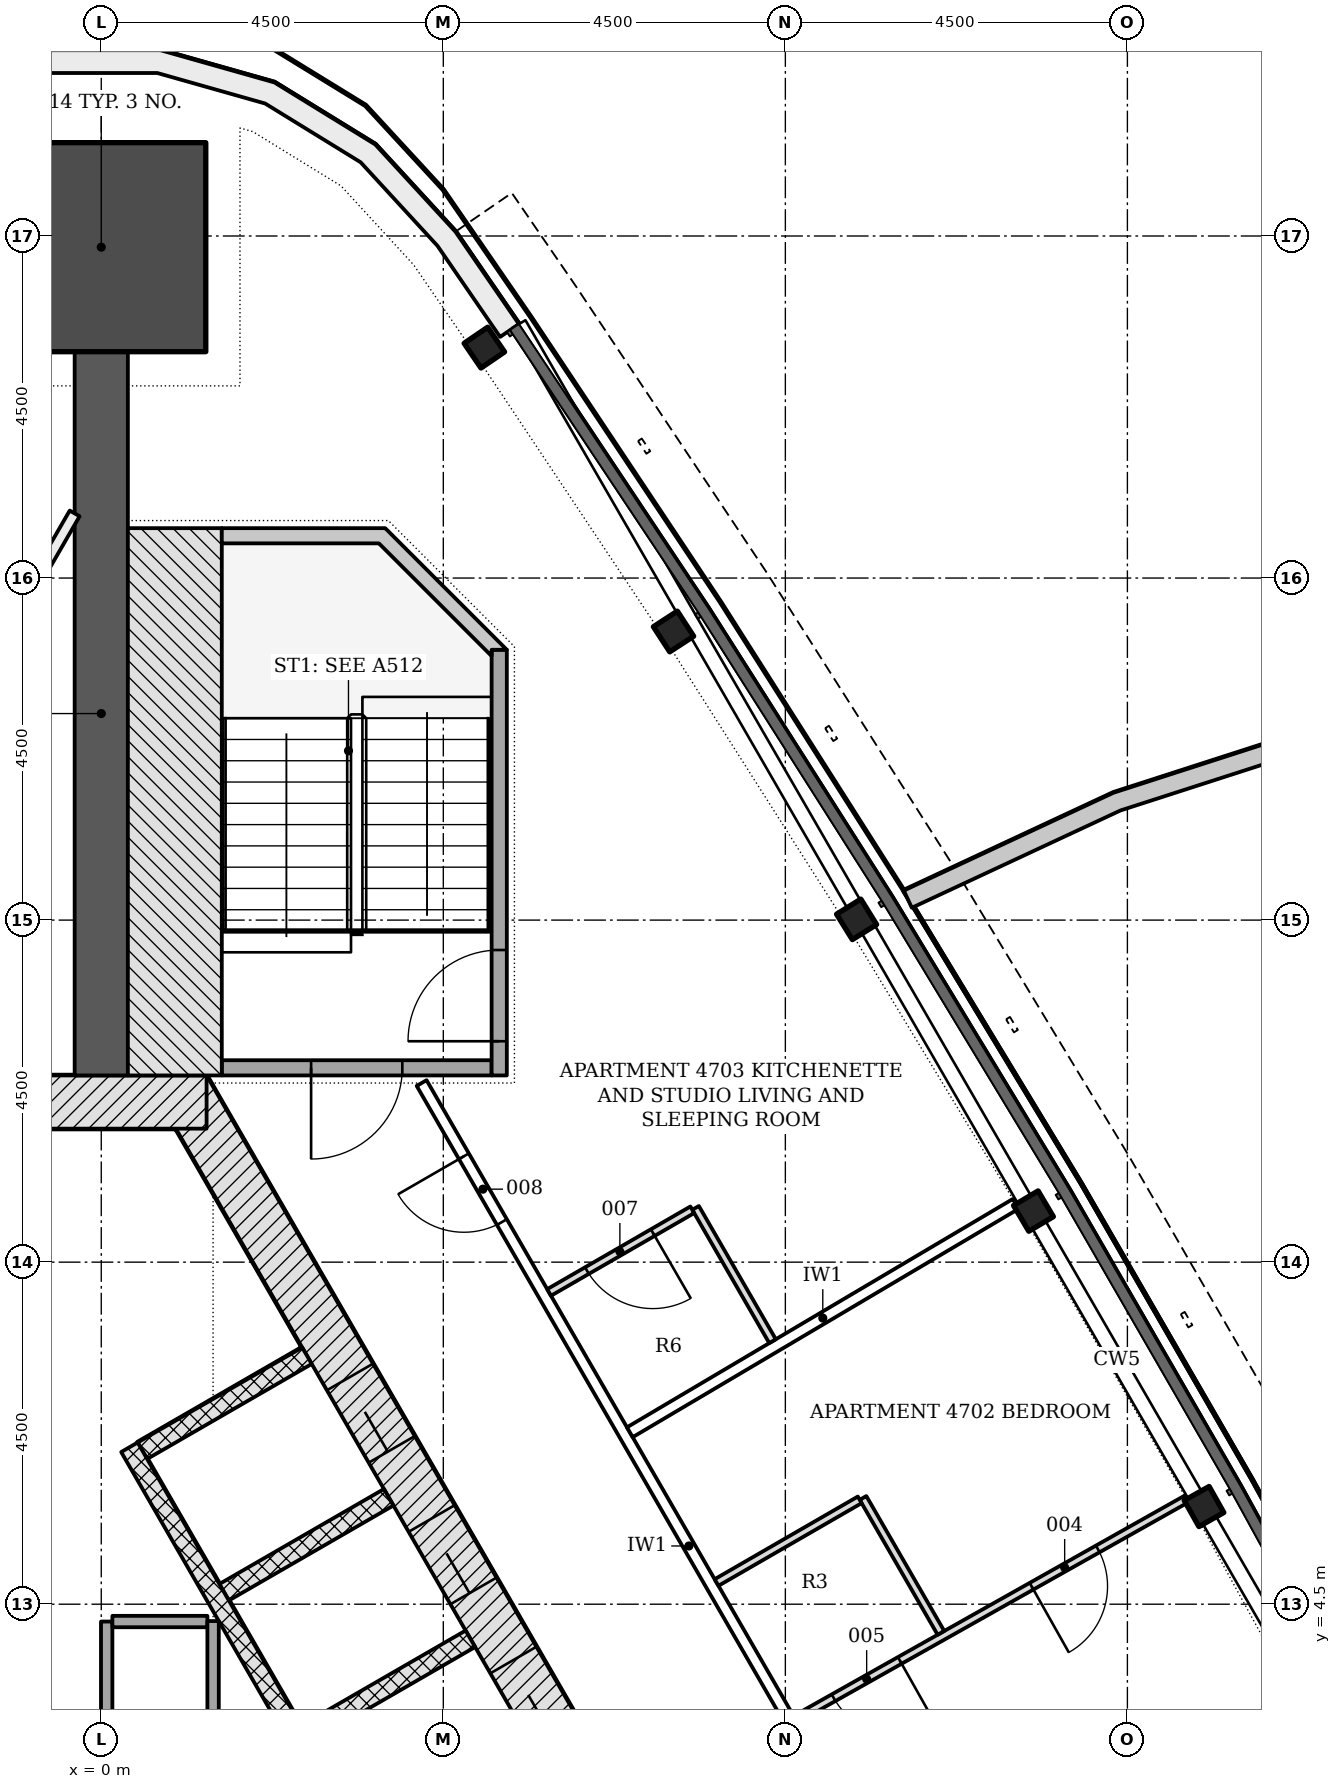
"""IFC4 building model, lengths in metres.
Left out: names, types, materials, properties, quantities, classifications, styles, units other than length and angle.
Written with IfcOpenShell. Run it as: python <this file> out.ifc"""

import sys

from ifc_helpers import new_model, si_unit, direction, frame, frame_2d, origin, origin_2d, place, context, subcontext, project, spatial, polyline, rectangle, i_section, outline, extrude, element, fill, save


model = new_model("IFC4")
c1 = context("Model", 3, precision=1e-05, world=origin(), true_north=direction((0.0, 1.0)))
c2 = subcontext(c1, "Body", "Model", "MODEL_VIEW")
j1 = project(units=[si_unit("LENGTHUNIT", "METRE"), si_unit("PLANEANGLEUNIT", "RADIAN")], contexts=[c1])
p1 = place(None, origin())
s1 = spatial("IfcSite", under=j1, at=p1, CompositionType="ELEMENT")
p2 = place(p1, origin())
s2 = spatial("IfcBuilding", under=s1, at=p2, CompositionType="ELEMENT")
p3 = place(p2, frame((0.0, 0.0, 185.1)))
s3 = spatial("IfcBuildingStorey", under=s2, at=p3, CompositionType="ELEMENT", Elevation=185.1)
p4 = place(p3, frame((10.311, -4.703, -0.2), z_axis=(0.0, 0.0, 1.0), x_axis=(-0.500001446645, 0.866024568562, 0.0)))
e1 = element("IfcWall", 1, at=p4, inside=s3, PredefinedType="SHEAR", context=c2, shape_type="SweptSolid", body=[
    extrude(rectangle(XDim=18.458, YDim=0.7, at=frame_2d((9.229, 0.0))), origin(), (0.0, 0.0, 1.0), 3.6),
])
p5 = place(p4, frame((4.379, 0.0, 0.2)))
e2 = element("IfcOpeningElement", 2, at=p5, cuts=e1, PredefinedType="OPENING", context=c2, shape_type="SweptSolid", body=[
    extrude(rectangle(XDim=1.1, YDim=2.1, at=frame_2d((0.55, 1.05))), frame((0.0, 0.36, 0.0), z_axis=(0.0, -1.0, 0.0), x_axis=(1.0, 0.0, 0.0)), (0.0, 0.0, 1.0), 0.72),
])
p6 = place(p4, frame((6.529, 0.0, 0.2)))
e3 = element("IfcOpeningElement", 3, at=p6, cuts=e1, PredefinedType="OPENING", context=c2, shape_type="SweptSolid", body=[
    extrude(rectangle(XDim=1.1, YDim=2.1, at=frame_2d((0.55, 1.05))), frame((0.0, 0.36, 0.0), z_axis=(0.0, -1.0, 0.0), x_axis=(1.0, 0.0, 0.0)), (0.0, 0.0, 1.0), 0.72),
])
p7 = place(p4, frame((8.679, 0.0, 0.2)))
e4 = element("IfcOpeningElement", 4, at=p7, cuts=e1, PredefinedType="OPENING", context=c2, shape_type="SweptSolid", body=[
    extrude(rectangle(XDim=1.1, YDim=2.1, at=frame_2d((0.55, 1.05))), frame((0.0, 0.36, 0.0), z_axis=(0.0, -1.0, 0.0), x_axis=(1.0, 0.0, 0.0)), (0.0, 0.0, 1.0), 0.72),
])
p8 = place(p4, frame((10.829, 0.0, 0.2)))
e5 = element("IfcOpeningElement", 5, at=p8, cuts=e1, PredefinedType="OPENING", context=c2, shape_type="SweptSolid", body=[
    extrude(rectangle(XDim=1.1, YDim=2.1, at=frame_2d((0.55, 1.05))), frame((0.0, 0.36, 0.0), z_axis=(0.0, -1.0, 0.0), x_axis=(1.0, 0.0, 0.0)), (0.0, 0.0, 1.0), 0.72),
])
p9 = place(p4, frame((12.979, 0.0, 0.2)))
e6 = element("IfcOpeningElement", 6, at=p9, cuts=e1, PredefinedType="OPENING", context=c2, shape_type="SweptSolid", body=[
    extrude(rectangle(XDim=1.1, YDim=2.1, at=frame_2d((0.55, 1.05))), frame((0.0, 0.36, 0.0), z_axis=(0.0, -1.0, 0.0), x_axis=(1.0, 0.0, 0.0)), (0.0, 0.0, 1.0), 0.72),
])
p10 = place(p3, frame((1.386, 11.106, -0.2), z_axis=(0.0, 0.0, 1.0), x_axis=(-1.0, 0.0, 0.0)))
e7 = element("IfcWall", 7, at=p10, inside=s3, PredefinedType="SHEAR", context=c2, shape_type="SweptSolid", body=[
    extrude(rectangle(XDim=2.771, YDim=0.7, at=frame_2d((1.386, 0.0))), origin(), (0.0, 0.0, 1.0), 3.6),
])
p11 = place(p3, frame((0.0, 11.456, -0.2), z_axis=(0.0, 0.0, 1.0), x_axis=(0.0, 1.0, 0.0)))
e8 = element("IfcWall", 8, at=p11, inside=s3, PredefinedType="SHEAR", context=c2, shape_type="SweptSolid", body=[
    extrude(rectangle(XDim=9.522, YDim=0.7, at=frame_2d((4.761, 0.0))), origin(), (0.0, 0.0, 1.0), 3.6),
])
p12 = place(p3, frame((0.0, 22.353, -0.2), z_axis=(0.0, 0.0, 1.0), x_axis=(0.0, 1.0, 0.0)))
e9 = element("IfcColumn", 9, at=p12, inside=s3, PredefinedType="COLUMN", context=c2, shape_type="SweptSolid", body=[
    extrude(rectangle(XDim=2.75, YDim=2.75, at=origin_2d()), origin(), (0.0, 0.0, 1.0), 3.6),
])
for number, where, z_axis, x_axis in (
    (10, (14.508, 5.785, -0.2), (0.0, 0.0, 1.0), (-0.491, 0.871, 0.0)),
    (11, (12.264, 9.672, -0.2), (0.0, 0.0, 1.0), (-0.509, 0.861, 0.0)),
    (12, (9.937, 13.51, -0.2), (0.0, 0.0, 1.0), (-0.528, 0.85, 0.0)),
    (13, (7.529, 17.297, -0.2), (0.0, 0.0, 1.0), (-0.546, 0.838, 0.0)),
    (14, (5.04, 21.032, -0.2), (0.0, 0.0, 1.0), (-0.563, 0.826, 0.0)),
):
    element("IfcColumn", number, at=place(p3, frame(where, z_axis=z_axis, x_axis=x_axis)), inside=s3, PredefinedType="COLUMN", context=c2, shape_type="SweptSolid", body=[
        extrude(i_section(OverallWidth=0.394, OverallDepth=0.376, WebThickness=0.017, FlangeThickness=0.028, FilletRadius=0.015, at=origin_2d()), origin(), (0.0, 0.0, 1.0), 3.6),
    ])
p13 = place(p3, origin())
e15 = element("IfcWall", 15, at=p13, inside=s3, PredefinedType="NOTDEFINED", context=c2, shape_type="SweptSolid", body=[
    extrude(outline(polyline([(5.494, 21.342), (4.659, 22.557), (3.605, 23.704), (2.278, 24.52), (0.779, 24.944), (-0.779, 24.944), (-2.278, 24.52), (-3.605, 23.704), (-4.659, 22.557), (-5.494, 21.342), (-5.247, 21.172), (-4.424, 22.369), (-3.412, 23.47), (-2.156, 24.243), (-0.737, 24.644), (0.737, 24.644), (2.156, 24.243), (3.412, 23.47), (4.424, 22.369), (5.247, 21.172), (5.494, 21.342)])), origin(), (0.0, 0.0, 1.0), 3.3),
])
p14 = place(p3, origin())
e16 = element("IfcWall", 16, at=p14, inside=s3, PredefinedType="PARAPET", context=c2, shape_type="SweptSolid", body=[
    extrude(outline(polyline([(22.265, -7.662), (24.846, -6.048), (27.171, -4.156), (29.169, -2.042), (30.78, 0.228), (31.954, 2.586), (32.656, 4.96), (32.864, 7.277), (32.572, 9.469), (31.789, 11.467), (30.539, 13.211), (28.86, 14.648), (26.802, 15.735), (24.429, 16.438), (21.812, 16.737), (19.031, 16.622), (16.171, 16.096), (13.317, 15.176), (10.558, 13.889), (10.664, 13.662), (13.409, 14.942), (16.232, 15.853), (19.059, 16.373), (21.803, 16.487), (24.379, 16.193), (26.708, 15.502), (28.719, 14.44), (30.354, 13.041), (31.568, 11.346), (32.328, 9.406), (32.612, 7.272), (32.409, 5.007), (31.72, 2.678), (30.565, 0.357), (28.976, -1.883), (27.001, -3.972), (24.7, -5.844), (22.132, -7.45), (22.265, -7.662)])), origin(), (0.0, 0.0, 1.0), 1.1),
])
for number, where, z_axis, x_axis in (
    (17, (4.856, 4.045, -0.2), (0.0, 0.0, 1.0), (-0.866, -0.5, 0.0)),
    (18, (3.781, 5.907, -0.2), (0.0, 0.0, 1.0), (-0.866, -0.5, 0.0)),
    (19, (2.706, 7.769, -0.2), (0.0, 0.0, 1.0), (-0.866, -0.5, 0.0)),
):
    element("IfcWall", number, at=place(p3, frame(where, z_axis=z_axis, x_axis=x_axis)), inside=s3, PredefinedType="PARTITIONING", context=c2, shape_type="SweptSolid", body=[
        extrude(rectangle(XDim=2.5, YDim=0.25, at=frame_2d((1.25, 0.0))), origin(), (0.0, 0.0, 1.0), 3.6),
    ])
p15 = place(p3, frame((5.87, -2.961, 0.0), z_axis=(0.0, 0.0, 1.0), x_axis=(-0.50000615651, 0.866021849293, 0.0)))
e20 = element("IfcWall", 20, at=p15, inside=s3, PredefinedType="PARTITIONING", context=c2, shape_type="SweptSolid", body=[
    extrude(rectangle(XDim=11.0, YDim=0.25, at=frame_2d((5.5, 0.0))), origin(), (0.0, 0.0, 1.0), 3.4),
])
p16 = place(p3, frame((0.071, 4.272, 0.0), z_axis=(0.0, 0.0, 1.0), x_axis=(0.0, -1.0, 0.0)))
e21 = element("IfcWall", 21, at=p16, inside=s3, PredefinedType="PARTITIONING", context=c2, shape_type="SweptSolid", body=[
    extrude(rectangle(XDim=10.5, YDim=0.15, at=frame_2d((5.25, 0.0))), origin(), (0.0, 0.0, 1.0), 3.4),
])
p17 = place(p16, frame((3.101, 0.0, 0.0)))
e22 = element("IfcOpeningElement", 22, at=p17, cuts=e21, PredefinedType="OPENING", context=c2, shape_type="SweptSolid", body=[
    extrude(rectangle(XDim=0.9, YDim=2.1, at=frame_2d((0.45, 1.05))), frame((0.0, 0.085, 0.0), z_axis=(0.0, -1.0, 0.0), x_axis=(1.0, 0.0, 0.0)), (0.0, 0.0, 1.0), 0.17),
])
p18 = place(p3, frame((0.146, 4.272, 0.0), z_axis=(0.0, 0.0, 1.0), x_axis=(1.0, 0.0, 0.0)))
e23 = element("IfcWall", 23, at=p18, inside=s3, PredefinedType="PARTITIONING", context=c2, shape_type="SweptSolid", body=[
    extrude(rectangle(XDim=1.25, YDim=0.15, at=frame_2d((0.625, 0.0))), origin(), (0.0, 0.0, 1.0), 3.4),
])
p19 = place(p3, frame((1.471, -5.928, 0.0), z_axis=(0.0, 0.0, 1.0), x_axis=(0.0, 1.0, 0.0)))
e24 = element("IfcWall", 24, at=p19, inside=s3, PredefinedType="PARTITIONING", context=c2, shape_type="SweptSolid", body=[
    extrude(rectangle(XDim=10.206, YDim=0.15, at=frame_2d((5.103, 0.0))), origin(), (0.0, 0.0, 1.0), 3.4),
])
p20 = place(p19, frame((6.15, 0.0, 0.0)))
e25 = element("IfcOpeningElement", 25, at=p20, cuts=e24, PredefinedType="OPENING", context=c2, shape_type="SweptSolid", body=[
    extrude(rectangle(XDim=1.0, YDim=2.1, at=frame_2d((0.5, 1.05))), frame((0.0, 0.085, 0.0), z_axis=(0.0, -1.0, 0.0), x_axis=(1.0, 0.0, 0.0)), (0.0, 0.0, 1.0), 0.17),
])
p21 = place(p3, frame((5.135, 11.556, -0.2), z_axis=(0.0, 0.0, 1.0), x_axis=(-1.0, 0.0, 0.0)))
e26 = element("IfcWall", 26, at=p21, inside=s3, PredefinedType="SHEAR", context=c2, shape_type="SweptSolid", body=[
    extrude(rectangle(XDim=3.55, YDim=0.2, at=frame_2d((1.775, 0.0))), origin(), (0.0, 0.0, 1.0), 3.6),
])
p22 = place(p21, frame((1.175, 0.0, 0.2)))
e27 = element("IfcOpeningElement", 27, at=p22, cuts=e26, PredefinedType="OPENING", context=c2, shape_type="SweptSolid", body=[
    extrude(rectangle(XDim=1.2, YDim=2.1, at=frame_2d((0.6, 1.05))), frame((0.0, 0.11, 0.0), z_axis=(0.0, -1.0, 0.0), x_axis=(1.0, 0.0, 0.0)), (0.0, 0.0, 1.0), 0.22),
])
p23 = place(p3, frame((5.236, 11.456, -0.2), z_axis=(0.0, 0.0, 1.0), x_axis=(0.0, 1.0, 0.0)))
e28 = element("IfcWall", 28, at=p23, inside=s3, PredefinedType="SHEAR", context=c2, shape_type="SweptSolid", body=[
    extrude(rectangle(XDim=5.6, YDim=0.2, at=frame_2d((2.8, 0.0))), origin(), (0.0, 0.0, 1.0), 3.6),
])
p24 = place(p23, frame((0.45, 0.0, 0.2)))
e29 = element("IfcOpeningElement", 29, at=p24, cuts=e28, PredefinedType="OPENING", context=c2, shape_type="SweptSolid", body=[
    extrude(rectangle(XDim=1.2, YDim=2.1, at=frame_2d((0.6, 1.05))), frame((0.0, 0.11, 0.0), z_axis=(0.0, -1.0, 0.0), x_axis=(1.0, 0.0, 0.0)), (0.0, 0.0, 1.0), 0.22),
])
p25 = place(p3, frame((0.968, 11.456, -0.2), z_axis=(0.0, 0.0, 1.0), x_axis=(0.0, 1.0, 0.0)))
e30 = element("IfcWall", 30, at=p25, inside=s3, PredefinedType="SHEAR", context=c2, shape_type="SweptSolid", body=[
    extrude(rectangle(XDim=7.2, YDim=1.236, at=frame_2d((3.6, 0.0))), origin(), (0.0, 0.0, 1.0), 3.6),
])
p26 = place(p3, frame((0.0, 0.0, -0.2)))
e31 = element("IfcWall", 31, at=p26, inside=s3, PredefinedType="SHEAR", context=c2, shape_type="SweptSolid", body=[
    extrude(outline(polyline([(5.336, 17.056), (3.736, 18.656), (1.586, 18.656), (1.586, 18.456), (3.653, 18.456), (5.135, 16.974), (5.135, 17.056), (5.135, 17.056), (5.135, 17.056), (5.135, 17.056), (5.135, 17.056), (5.135, 17.056), (5.135, 17.056), (5.135, 17.056), (5.135, 17.056), (5.135, 17.056), (5.135, 17.056), (5.135, 17.056), (5.135, 17.056), (5.135, 17.056), (5.135, 17.056), (5.135, 17.056), (5.135, 17.056), (5.336, 17.056)])), origin(), (0.0, 0.0, 1.0), 3.6),
])
p27 = place(p3, frame((11.247, -0.824, 0.0), z_axis=(0.0, 0.0, 1.0), x_axis=(-0.499997921847, 0.866026603603, 0.0)))
e32 = element("IfcWall", 32, at=p27, inside=s3, PredefinedType="PARTITIONING", context=c2, shape_type="SweptSolid", body=[
    extrude(rectangle(XDim=14.065, YDim=0.15, at=frame_2d((7.032, 0.0))), origin(), (0.0, 0.0, 1.0), 2.847),
])
p28 = place(p27, frame((11.953, 0.0, 0.0)))
e33 = element("IfcOpeningElement", 33, at=p28, cuts=e32, PredefinedType="OPENING", context=c2, shape_type="SweptSolid", body=[
    extrude(rectangle(XDim=1.0, YDim=2.1, at=frame_2d((0.5, 1.05))), frame((0.0, 0.085, 0.0), z_axis=(0.0, -1.0, 0.0), x_axis=(1.0, 0.0, 0.0)), (0.0, 0.0, 1.0), 0.17),
])
p29 = place(p3, frame((14.277, 5.885, 0.0), z_axis=(0.0, 0.0, 1.0), x_axis=(-0.871335785584, -0.490687220907, 0.0)))
e34 = element("IfcWall", 34, at=p29, inside=s3, PredefinedType="PARTITIONING", context=c2, shape_type="SweptSolid", body=[
    extrude(rectangle(XDim=5.904, YDim=0.1, at=frame_2d((2.952, 0.0))), origin(), (0.0, 0.0, 1.0), 3.4),
])
p30 = place(p29, frame((1.339, 0.0, 0.0)))
e35 = element("IfcOpeningElement", 35, at=p30, cuts=e34, PredefinedType="OPENING", context=c2, shape_type="SweptSolid", body=[
    extrude(rectangle(XDim=1.0, YDim=2.1, at=frame_2d((0.5, 1.05))), frame((0.0, 0.06, 0.0), z_axis=(0.0, -1.0, 0.0), x_axis=(1.0, 0.0, 0.0)), (0.0, 0.0, 1.0), 0.12),
])
p31 = place(p29, frame((4.329, 0.0, 0.0)))
e36 = element("IfcOpeningElement", 36, at=p31, cuts=e34, PredefinedType="OPENING", context=c2, shape_type="SweptSolid", body=[
    extrude(rectangle(XDim=1.0, YDim=2.1, at=frame_2d((0.5, 1.05))), frame((0.0, 0.06, 0.0), z_axis=(0.0, -1.0, 0.0), x_axis=(1.0, 0.0, 0.0)), (0.0, 0.0, 1.0), 0.12),
])
p32 = place(p3, frame((11.047, 4.123, 0.0), z_axis=(0.0, 0.0, 1.0), x_axis=(-0.500007699544, 0.866020958405, 0.0)))
e37 = element("IfcWall", 37, at=p32, inside=s3, PredefinedType="PARTITIONING", context=c2, shape_type="SweptSolid", body=[
    extrude(rectangle(XDim=2.05, YDim=0.1, at=frame_2d((1.025, 0.0))), origin(), (0.0, 0.0, 1.0), 3.4),
])
p33 = place(p3, frame((9.979, 5.873, 0.0), z_axis=(0.0, 0.0, 1.0), x_axis=(-0.866037911478, -0.499978335414, 0.0)))
e38 = element("IfcWall", 38, at=p33, inside=s3, PredefinedType="PARTITIONING", context=c2, shape_type="SweptSolid", body=[
    extrude(rectangle(XDim=2.175, YDim=0.1, at=frame_2d((1.087, 0.0))), origin(), (0.0, 0.0, 1.0), 3.4),
])
p34 = place(p3, frame((12.031, 9.766, 0.0), z_axis=(0.0, 0.0, 1.0), x_axis=(-0.860638865546, -0.509215811922, 0.0)))
e39 = element("IfcWall", 39, at=p34, inside=s3, PredefinedType="PARTITIONING", context=c2, shape_type="SweptSolid", body=[
    extrude(rectangle(XDim=5.9, YDim=0.15, at=frame_2d((2.95, 0.0))), origin(), (0.0, 0.0, 1.0), 3.4),
])
p35 = place(p3, frame((8.831, 7.96, 0.0), z_axis=(0.0, 0.0, 1.0), x_axis=(-0.499990325971, 0.866030989016, 0.0)))
e40 = element("IfcWall", 40, at=p35, inside=s3, PredefinedType="PARTITIONING", context=c2, shape_type="SweptSolid", body=[
    extrude(rectangle(XDim=2.025, YDim=0.1, at=frame_2d((1.012, 0.0))), origin(), (0.0, 0.0, 1.0), 3.4),
])
p36 = place(p3, frame((7.775, 9.689, 0.0), z_axis=(0.0, 0.0, 1.0), x_axis=(-0.865989304205, -0.500062521093, 0.0)))
e41 = element("IfcWall", 41, at=p36, inside=s3, PredefinedType="PARTITIONING", context=c2, shape_type="SweptSolid", body=[
    extrude(rectangle(XDim=2.175, YDim=0.1, at=frame_2d((1.087, 0.0))), origin(), (0.0, 0.0, 1.0), 3.4),
])
p37 = place(p36, frame((0.6, 0.0, 0.0)))
e42 = element("IfcOpeningElement", 42, at=p37, cuts=e41, PredefinedType="OPENING", context=c2, shape_type="SweptSolid", body=[
    extrude(rectangle(XDim=1.0, YDim=2.1, at=frame_2d((0.5, 1.05))), frame((0.0, 0.06, 0.0), z_axis=(0.0, -1.0, 0.0), x_axis=(1.0, 0.0, 0.0)), (0.0, 0.0, 1.0), 0.12),
])
p38 = place(p3, frame((-0.35, 18.85, 0.0), z_axis=(0.0, 0.0, 1.0), x_axis=(-0.500005388685, -0.866022292603, 0.0)))
e43 = element("IfcWall", 43, at=p38, inside=s3, PredefinedType="PARTITIONING", context=c2, shape_type="SweptSolid", body=[
    extrude(rectangle(XDim=14.167, YDim=0.15, at=frame_2d((7.083, 0.0))), origin(), (0.0, 0.0, 1.0), 2.847),
])
p39 = place(p7, origin())
e44 = element("IfcDoor", 44, at=p39, inside=s3, OperationType="DOUBLE_DOOR_SLIDING", PredefinedType="DOOR", context=c2, shape_type="SweptSolid", body=[
    extrude(rectangle(XDim=1.1, YDim=2.1, at=frame_2d((0.55, 1.05))), frame((0.0, 0.025, 0.0), z_axis=(0.0, -1.0, 0.0), x_axis=(1.0, 0.0, 0.0)), (0.0, 0.0, 1.0), 0.05),
])
fill(e4, e44)
p40 = place(p8, origin())
e45 = element("IfcDoor", 45, at=p40, inside=s3, OperationType="DOUBLE_DOOR_SLIDING", PredefinedType="DOOR", context=c2, shape_type="SweptSolid", body=[
    extrude(rectangle(XDim=1.1, YDim=2.1, at=frame_2d((0.55, 1.05))), frame((0.0, 0.025, 0.0), z_axis=(0.0, -1.0, 0.0), x_axis=(1.0, 0.0, 0.0)), (0.0, 0.0, 1.0), 0.05),
])
fill(e5, e45)
p41 = place(p9, origin())
e46 = element("IfcDoor", 46, at=p41, inside=s3, OperationType="DOUBLE_DOOR_SLIDING", PredefinedType="DOOR", context=c2, shape_type="SweptSolid", body=[
    extrude(rectangle(XDim=1.1, YDim=2.1, at=frame_2d((0.55, 1.05))), frame((0.0, 0.025, 0.0), z_axis=(0.0, -1.0, 0.0), x_axis=(1.0, 0.0, 0.0)), (0.0, 0.0, 1.0), 0.05),
])
fill(e6, e46)
p42 = place(p22, origin())
e47 = element("IfcDoor", 47, at=p42, inside=s3, OperationType="SINGLE_SWING_RIGHT", PredefinedType="DOOR", context=c2, shape_type="SweptSolid", body=[
    extrude(rectangle(XDim=1.2, YDim=2.1, at=frame_2d((0.6, 1.05))), frame((0.0, 0.025, 0.0), z_axis=(0.0, -1.0, 0.0), x_axis=(1.0, 0.0, 0.0)), (0.0, 0.0, 1.0), 0.05),
])
fill(e27, e47)
p43 = place(p24, origin())
e48 = element("IfcDoor", 48, at=p43, inside=s3, OperationType="SINGLE_SWING_LEFT", PredefinedType="DOOR", context=c2, shape_type="SweptSolid", body=[
    extrude(rectangle(XDim=1.2, YDim=2.1, at=frame_2d((0.6, 1.05))), frame((0.0, 0.025, 0.0), z_axis=(0.0, -1.0, 0.0), x_axis=(1.0, 0.0, 0.0)), (0.0, 0.0, 1.0), 0.05),
])
fill(e29, e48)
p44 = place(p30, origin())
e49 = element("IfcDoor", 49, at=p44, inside=s3, OperationType="SINGLE_SWING_RIGHT", PredefinedType="DOOR", context=c2, shape_type="SweptSolid", body=[
    extrude(rectangle(XDim=1.0, YDim=2.1, at=frame_2d((0.5, 1.05))), frame((0.0, 0.025, 0.0), z_axis=(0.0, -1.0, 0.0), x_axis=(1.0, 0.0, 0.0)), (0.0, 0.0, 1.0), 0.05),
])
fill(e35, e49)
p45 = place(p31, origin())
e50 = element("IfcDoor", 50, at=p45, inside=s3, OperationType="SINGLE_SWING_LEFT", PredefinedType="DOOR", context=c2, shape_type="SweptSolid", body=[
    extrude(rectangle(XDim=1.0, YDim=2.1, at=frame_2d((0.5, 1.05))), frame((0.0, 0.025, 0.0), z_axis=(0.0, -1.0, 0.0), x_axis=(1.0, 0.0, 0.0)), (0.0, 0.0, 1.0), 0.05),
])
fill(e36, e50)
p46 = place(p37, origin())
e51 = element("IfcDoor", 51, at=p46, inside=s3, OperationType="SINGLE_SWING_LEFT", PredefinedType="DOOR", context=c2, shape_type="SweptSolid", body=[
    extrude(rectangle(XDim=1.0, YDim=2.1, at=frame_2d((0.5, 1.05))), frame((0.0, 0.025, 0.0), z_axis=(0.0, -1.0, 0.0), x_axis=(1.0, 0.0, 0.0)), (0.0, 0.0, 1.0), 0.05),
])
fill(e42, e51)
p47 = place(p28, origin())
e52 = element("IfcDoor", 52, at=p47, inside=s3, OperationType="SINGLE_SWING_RIGHT", PredefinedType="DOOR", context=c2, shape_type="SweptSolid", body=[
    extrude(rectangle(XDim=1.0, YDim=2.1, at=frame_2d((0.5, 1.05))), frame((0.0, 0.025, 0.0), z_axis=(0.0, -1.0, 0.0), x_axis=(1.0, 0.0, 0.0)), (0.0, 0.0, 1.0), 0.05),
])
fill(e33, e52)
save(model, sys.argv[1])
